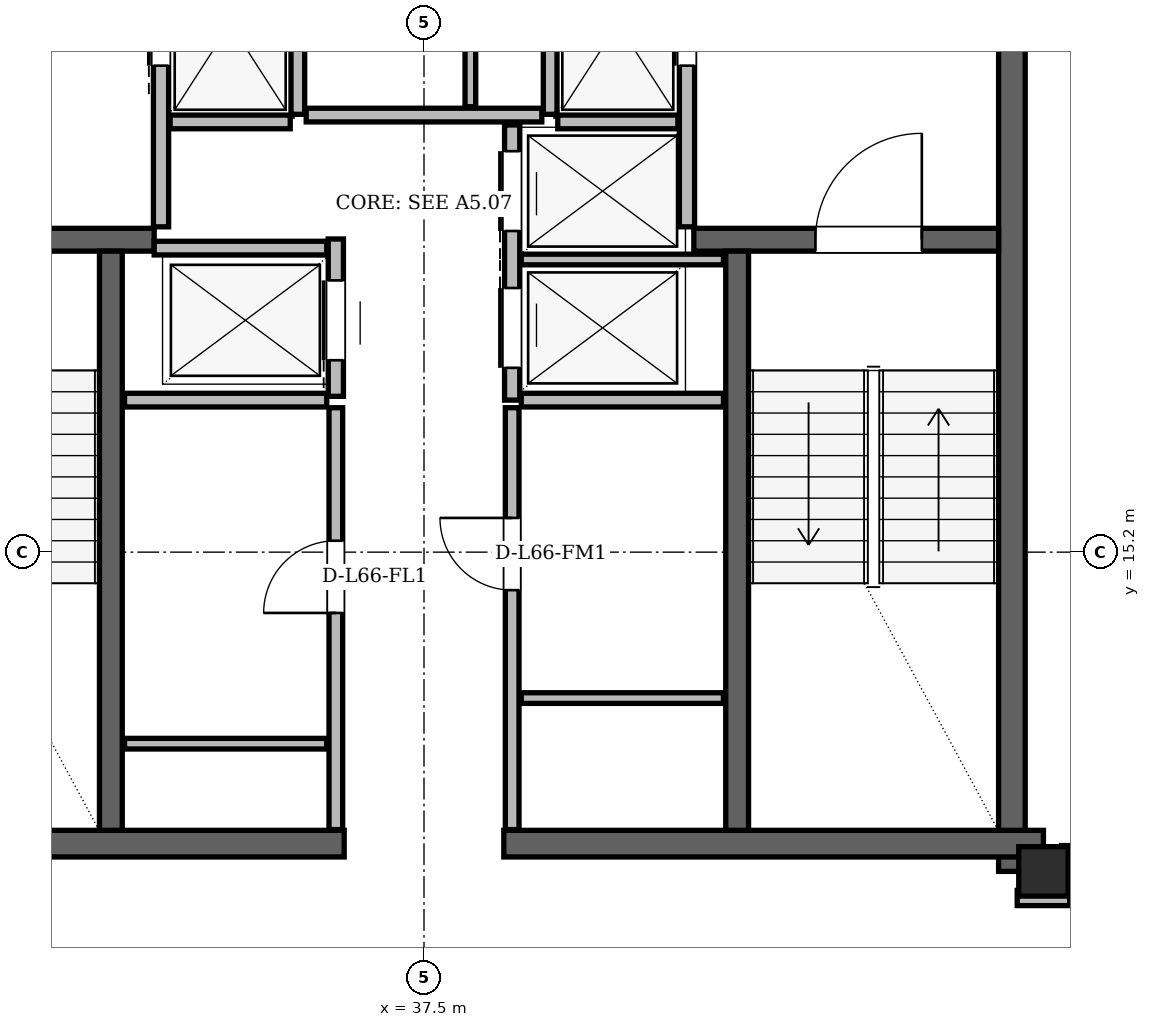
"""IFC4 building model, lengths in metres.
Left out: names, types, materials, properties, quantities, classifications, styles, units other than length and angle.
Written with IfcOpenShell. Run it as: python <this file> out.ifc"""

import sys

from ifc_helpers import new_model, si_unit, direction, frame, frame_2d, origin, origin_2d, place, context, subcontext, project, spatial, rectangle, hollow_rectangle, extrude, element, fill, save


model = new_model("IFC4")
c1 = context("Model", 3, precision=1e-05, world=origin(), true_north=direction((0.0, 1.0)))
c2 = subcontext(c1, "Body", "Model", "MODEL_VIEW")
j1 = project(units=[si_unit("LENGTHUNIT", "METRE"), si_unit("PLANEANGLEUNIT", "RADIAN")], contexts=[c1])
p1 = place(None, origin())
s1 = spatial("IfcSite", under=j1, at=p1, CompositionType="ELEMENT")
p2 = place(p1, origin())
s2 = spatial("IfcBuilding", under=s1, at=p2, CompositionType="ELEMENT")
p3 = place(p2, frame((0.0, 0.0, 249.9)))
s3 = spatial("IfcBuildingStorey", under=s2, at=p3, CompositionType="ELEMENT", Elevation=249.9)
p4 = place(p3, frame((45.65, 11.0, 0.0), z_axis=(0.0, 0.0, 1.0), x_axis=(1.0, 0.0, 0.0)))
e1 = element("IfcColumn", 1, at=p4, inside=s3, PredefinedType="COLUMN", context=c2, shape_type="SweptSolid", body=[
    extrude(hollow_rectangle(XDim=0.65, YDim=0.65, WallThickness=0.05, at=origin_2d()), origin(), (0.0, 0.0, 1.0), 3.9),
])
p5 = place(p3, frame((45.235, 11.0, 0.0), z_axis=(0.0, 0.0, 1.0), x_axis=(0.0, 1.0, 0.0)))
e2 = element("IfcWall", 2, at=p5, inside=s3, PredefinedType="SHEAR", context=c2, shape_type="SweptSolid", body=[
    extrude(rectangle(XDim=13.3, YDim=0.35, at=frame_2d((6.65, 0.0))), origin(), (0.0, 0.0, 1.0), 3.68),
])
for number, where, z_axis, x_axis in (
    (3, (29.35, 11.365, 0.0), (0.0, 0.0, 1.0), (1.0, 0.0, 0.0)),
    (4, (38.55, 11.365, 0.0), (0.0, 0.0, 1.0), (1.0, 0.0, 0.0)),
):
    element("IfcWall", number, at=place(p3, frame(where, z_axis=z_axis, x_axis=x_axis)), inside=s3, PredefinedType="SHEAR", context=c2, shape_type="SweptSolid", body=[
        extrude(rectangle(XDim=7.1, YDim=0.35, at=frame_2d((3.55, 0.0))), origin(), (0.0, 0.0, 1.0), 3.68),
    ])
p6 = place(p3, frame((29.94, 19.31, 0.0), z_axis=(0.0, 0.0, 1.0), x_axis=(1.0, 0.0, 0.0)))
e5 = element("IfcWall", 5, at=p6, inside=s3, PredefinedType="SHEAR", context=c2, shape_type="SweptSolid", body=[
    extrude(rectangle(XDim=4.01, YDim=0.3, at=frame_2d((2.005, 0.0))), origin(), (0.0, 0.0, 1.0), 3.68),
])
p7 = place(p6, frame((1.01, 0.0, 0.0)))
e6 = element("IfcOpeningElement", 6, at=p7, cuts=e5, PredefinedType="OPENING", context=c2, shape_type="SweptSolid", body=[
    extrude(rectangle(XDim=1.4, YDim=2.2, at=frame_2d((0.7, 1.1))), frame((0.0, 0.15, 0.0), z_axis=(0.0, -1.0, 0.0), x_axis=(1.0, 0.0, 0.0)), (0.0, 0.0, 1.0), 0.3),
])
p8 = place(p3, frame((41.05, 19.31, 0.0), z_axis=(0.0, 0.0, 1.0), x_axis=(1.0, 0.0, 0.0)))
e7 = element("IfcWall", 7, at=p8, inside=s3, PredefinedType="SHEAR", context=c2, shape_type="SweptSolid", body=[
    extrude(rectangle(XDim=4.01, YDim=0.3, at=frame_2d((2.005, 0.0))), origin(), (0.0, 0.0, 1.0), 3.68),
])
p9 = place(p8, frame((1.6, 0.0, 0.0)))
e8 = element("IfcOpeningElement", 8, at=p9, cuts=e7, PredefinedType="OPENING", context=c2, shape_type="SweptSolid", body=[
    extrude(rectangle(XDim=1.4, YDim=2.2, at=frame_2d((0.7, 1.1))), frame((0.0, 0.15, 0.0), z_axis=(0.0, -1.0, 0.0), x_axis=(1.0, 0.0, 0.0)), (0.0, 0.0, 1.0), 0.3),
])
for number, where, z_axis, x_axis in (
    (9, (33.38, 11.54, 0.0), (0.0, 0.0, 1.0), (0.0, 1.0, 0.0)),
    (10, (41.62, 11.54, 0.0), (0.0, 0.0, 1.0), (0.0, 1.0, 0.0)),
):
    element("IfcWall", number, at=place(p3, frame(where, z_axis=z_axis, x_axis=x_axis)), inside=s3, PredefinedType="SHEAR", context=c2, shape_type="SweptSolid", body=[
        extrude(rectangle(XDim=7.62, YDim=0.3, at=frame_2d((3.81, 0.0))), origin(), (0.0, 0.0, 1.0), 3.68),
    ])
p10 = place(p3, frame((58.774, 10.99, 0.0), z_axis=(0.0, 0.0, 1.0), x_axis=(-0.499994896969, 0.866028350001, 0.0)))
e11 = element("IfcWall", 11, at=p10, inside=s3, PredefinedType="SOLIDWALL", context=c2, shape_type="SweptSolid", body=[
    extrude(rectangle(XDim=37.053, YDim=0.29, at=frame_2d((18.526, 0.0))), origin(), (0.0, 0.0, 1.0), 3.058),
])
p11 = place(p10, frame((6.789, 0.0, 0.0)))
e12 = element("IfcOpeningElement", 12, at=p11, cuts=e11, PredefinedType="OPENING", context=c2, shape_type="SweptSolid", body=[
    extrude(rectangle(XDim=1.5, YDim=2.2, at=frame_2d((0.75, 1.1))), frame((0.0, 0.145, 0.0), z_axis=(0.0, -1.0, 0.0), x_axis=(1.0, 0.0, 0.0)), (0.0, 0.0, 1.0), 0.29),
])
p12 = place(p10, frame((28.148, 0.0, 0.0)))
e13 = element("IfcOpeningElement", 13, at=p12, cuts=e11, PredefinedType="OPENING", context=c2, shape_type="SweptSolid", body=[
    extrude(rectangle(XDim=1.5, YDim=2.2, at=frame_2d((0.75, 1.1))), frame((0.0, 0.145, 0.0), z_axis=(0.0, -1.0, 0.0), x_axis=(1.0, 0.0, 0.0)), (0.0, 0.0, 1.0), 0.29),
])
p13 = place(p10, frame((12.184, 0.0, 0.85)))
e14 = element("IfcOpeningElement", 14, at=p13, cuts=e11, PredefinedType="OPENING", context=c2, shape_type="SweptSolid", body=[
    extrude(rectangle(XDim=2.6, YDim=1.95, at=frame_2d((1.3, 0.975))), frame((0.0, 0.145, 0.0), z_axis=(0.0, -1.0, 0.0), x_axis=(1.0, 0.0, 0.0)), (0.0, 0.0, 1.0), 0.29),
])
p14 = place(p10, frame((1.066, 0.0, 0.85)))
e15 = element("IfcOpeningElement", 15, at=p14, cuts=e11, PredefinedType="OPENING", context=c2, shape_type="SweptSolid", body=[
    extrude(rectangle(XDim=2.4, YDim=1.9, at=frame_2d((1.2, 0.95))), frame((0.0, 0.145, 0.0), z_axis=(0.0, -1.0, 0.0), x_axis=(1.0, 0.0, 0.0)), (0.0, 0.0, 1.0), 0.29),
])
p15 = place(p10, frame((33.328, 0.0, 0.85)))
e16 = element("IfcOpeningElement", 16, at=p15, cuts=e11, PredefinedType="OPENING", context=c2, shape_type="SweptSolid", body=[
    extrude(rectangle(XDim=1.2, YDim=1.48, at=frame_2d((0.6, 0.74))), frame((0.0, 0.145, 0.0), z_axis=(0.0, -1.0, 0.0), x_axis=(1.0, 0.0, 0.0)), (0.0, 0.0, 1.0), 0.29),
])
p16 = place(p10, frame((15.822, 0.0, 0.85)))
e17 = element("IfcOpeningElement", 17, at=p16, cuts=e11, PredefinedType="OPENING", context=c2, shape_type="SweptSolid", body=[
    extrude(rectangle(XDim=1.2, YDim=1.48, at=frame_2d((0.6, 0.74))), frame((0.0, 0.145, 0.0), z_axis=(0.0, -1.0, 0.0), x_axis=(1.0, 0.0, 0.0)), (0.0, 0.0, 1.0), 0.29),
])
p17 = place(p10, frame((23.327, 0.0, 0.85)))
e18 = element("IfcOpeningElement", 18, at=p17, cuts=e11, PredefinedType="OPENING", context=c2, shape_type="SweptSolid", body=[
    extrude(rectangle(XDim=1.2, YDim=1.48, at=frame_2d((0.6, 0.74))), frame((0.0, 0.145, 0.0), z_axis=(0.0, -1.0, 0.0), x_axis=(1.0, 0.0, 0.0)), (0.0, 0.0, 1.0), 0.29),
])
p18 = place(p3, frame((34.752, 43.079, 0.0), z_axis=(0.0, 0.0, 1.0), x_axis=(-0.499994896969, -0.866028350001, 0.0)))
e19 = element("IfcWall", 19, at=p18, inside=s3, PredefinedType="SOLIDWALL", context=c2, shape_type="SweptSolid", body=[
    extrude(rectangle(XDim=37.053, YDim=0.29, at=frame_2d((18.526, 0.0))), origin(), (0.0, 0.0, 1.0), 3.058),
])
p19 = place(p18, frame((3.639, 0.0, 0.0)))
e20 = element("IfcOpeningElement", 20, at=p19, cuts=e19, PredefinedType="OPENING", context=c2, shape_type="SweptSolid", body=[
    extrude(rectangle(XDim=1.5, YDim=2.2, at=frame_2d((0.75, 1.1))), frame((0.0, 0.145, 0.0), z_axis=(0.0, -1.0, 0.0), x_axis=(1.0, 0.0, 0.0)), (0.0, 0.0, 1.0), 0.29),
])
p20 = place(p18, frame((27.518, 0.0, 0.0)))
e21 = element("IfcOpeningElement", 21, at=p20, cuts=e19, PredefinedType="OPENING", context=c2, shape_type="SweptSolid", body=[
    extrude(rectangle(XDim=1.5, YDim=2.2, at=frame_2d((0.75, 1.1))), frame((0.0, 0.145, 0.0), z_axis=(0.0, -1.0, 0.0), x_axis=(1.0, 0.0, 0.0)), (0.0, 0.0, 1.0), 0.29),
])
p21 = place(p18, frame((22.803, 0.0, 0.85)))
e22 = element("IfcOpeningElement", 22, at=p21, cuts=e19, PredefinedType="OPENING", context=c2, shape_type="SweptSolid", body=[
    extrude(rectangle(XDim=1.6, YDim=1.7, at=frame_2d((0.8, 0.85))), frame((0.0, 0.145, 0.0), z_axis=(0.0, -1.0, 0.0), x_axis=(1.0, 0.0, 0.0)), (0.0, 0.0, 1.0), 0.29),
])
p22 = place(p18, frame((34.371, 0.0, 0.85)))
e23 = element("IfcOpeningElement", 23, at=p22, cuts=e19, PredefinedType="OPENING", context=c2, shape_type="SweptSolid", body=[
    extrude(rectangle(XDim=1.4, YDim=1.6, at=frame_2d((0.7, 0.8))), frame((0.0, 0.145, 0.0), z_axis=(0.0, -1.0, 0.0), x_axis=(1.0, 0.0, 0.0)), (0.0, 0.0, 1.0), 0.29),
])
p23 = place(p18, frame((8.135, 0.0, 0.85)))
e24 = element("IfcOpeningElement", 24, at=p23, cuts=e19, PredefinedType="OPENING", context=c2, shape_type="SweptSolid", body=[
    extrude(rectangle(XDim=1.8, YDim=1.75, at=frame_2d((0.9, 0.875))), frame((0.0, 0.145, 0.0), z_axis=(0.0, -1.0, 0.0), x_axis=(1.0, 0.0, 0.0)), (0.0, 0.0, 1.0), 0.29),
])
p24 = place(p18, frame((17.81, 0.0, 0.85)))
e25 = element("IfcOpeningElement", 25, at=p24, cuts=e19, PredefinedType="OPENING", context=c2, shape_type="SweptSolid", body=[
    extrude(rectangle(XDim=1.2, YDim=1.48, at=frame_2d((0.6, 0.74))), frame((0.0, 0.145, 0.0), z_axis=(0.0, -1.0, 0.0), x_axis=(1.0, 0.0, 0.0)), (0.0, 0.0, 1.0), 0.29),
])
p25 = place(p18, frame((1.294, 0.0, 0.85)))
e26 = element("IfcOpeningElement", 26, at=p25, cuts=e19, PredefinedType="OPENING", context=c2, shape_type="SweptSolid", body=[
    extrude(rectangle(XDim=1.6, YDim=1.7, at=frame_2d((0.8, 0.85))), frame((0.0, 0.145, 0.0), z_axis=(0.0, -1.0, 0.0), x_axis=(1.0, 0.0, 0.0)), (0.0, 0.0, 1.0), 0.29),
])
p26 = place(p3, frame((34.04, 19.48, 0.0), z_axis=(0.0, 0.0, 1.0), x_axis=(0.0, 1.0, 0.0)))
e27 = element("IfcWall", 27, at=p26, inside=s3, PredefinedType="PARTITIONING", context=c2, shape_type="SweptSolid", body=[
    extrude(rectangle(XDim=4.5, YDim=0.2, at=frame_2d((2.25, 0.0))), origin(), (0.0, 0.0, 1.0), 3.68),
])
p27 = place(p26, frame((2.12, 0.0, 0.0)))
e28 = element("IfcOpeningElement", 28, at=p27, cuts=e27, PredefinedType="OPENING", context=c2, shape_type="SweptSolid", body=[
    extrude(rectangle(XDim=1.1, YDim=2.2, at=frame_2d((0.55, 1.1))), frame((0.0, 0.1, 0.0), z_axis=(0.0, -1.0, 0.0), x_axis=(1.0, 0.0, 0.0)), (0.0, 0.0, 1.0), 0.2),
])
p28 = place(p3, frame((35.84, 20.96, 0.0), z_axis=(0.0, 0.0, 1.0), x_axis=(0.0, 1.0, 0.0)))
e29 = element("IfcWall", 29, at=p28, inside=s3, PredefinedType="PARTITIONING", context=c2, shape_type="SweptSolid", body=[
    extrude(rectangle(XDim=3.02, YDim=0.18, at=frame_2d((1.51, 0.0))), origin(), (0.0, 0.0, 1.0), 3.68),
])
p29 = place(p3, frame((34.16, 20.86, 0.0), z_axis=(0.0, 0.0, 1.0), x_axis=(1.0, 0.0, 0.0)))
e30 = element("IfcWall", 30, at=p29, inside=s3, PredefinedType="PARTITIONING", context=c2, shape_type="SweptSolid", body=[
    extrude(rectangle(XDim=1.58, YDim=0.18, at=frame_2d((0.79, 0.0))), origin(), (0.0, 0.0, 1.0), 3.68),
])
p30 = place(p3, frame((40.96, 19.48, 0.0), z_axis=(0.0, 0.0, 1.0), x_axis=(0.0, 1.0, 0.0)))
e31 = element("IfcWall", 31, at=p30, inside=s3, PredefinedType="PARTITIONING", context=c2, shape_type="SweptSolid", body=[
    extrude(rectangle(XDim=4.5, YDim=0.2, at=frame_2d((2.25, 0.0))), origin(), (0.0, 0.0, 1.0), 3.68),
])
p31 = place(p30, frame((2.12, 0.0, 0.0)))
e32 = element("IfcOpeningElement", 32, at=p31, cuts=e31, PredefinedType="OPENING", context=c2, shape_type="SweptSolid", body=[
    extrude(rectangle(XDim=1.1, YDim=2.2, at=frame_2d((0.55, 1.1))), frame((0.0, 0.1, 0.0), z_axis=(0.0, -1.0, 0.0), x_axis=(1.0, 0.0, 0.0)), (0.0, 0.0, 1.0), 0.2),
])
p32 = place(p3, frame((39.16, 20.96, 0.0), z_axis=(0.0, 0.0, 1.0), x_axis=(0.0, 1.0, 0.0)))
e33 = element("IfcWall", 33, at=p32, inside=s3, PredefinedType="PARTITIONING", context=c2, shape_type="SweptSolid", body=[
    extrude(rectangle(XDim=3.02, YDim=0.18, at=frame_2d((1.51, 0.0))), origin(), (0.0, 0.0, 1.0), 3.68),
])
p33 = place(p3, frame((39.26, 20.86, 0.0), z_axis=(0.0, 0.0, 1.0), x_axis=(1.0, 0.0, 0.0)))
e34 = element("IfcWall", 34, at=p33, inside=s3, PredefinedType="PARTITIONING", context=c2, shape_type="SweptSolid", body=[
    extrude(rectangle(XDim=1.58, YDim=0.18, at=frame_2d((0.79, 0.0))), origin(), (0.0, 0.0, 1.0), 3.68),
])
p34 = place(p3, frame((36.34, 17.25, 0.0), z_axis=(0.0, 0.0, 1.0), x_axis=(0.0, 1.0, 0.0)))
e35 = element("IfcWall", 35, at=p34, inside=s3, PredefinedType="PARTITIONING", context=c2, shape_type="SweptSolid", body=[
    extrude(rectangle(XDim=2.07, YDim=0.2, at=frame_2d((1.035, 0.0))), origin(), (0.0, 0.0, 1.0), 3.68),
])
p35 = place(p34, frame((0.475, 0.0, 0.0)))
e36 = element("IfcOpeningElement", 36, at=p35, cuts=e35, PredefinedType="OPENING", context=c2, shape_type="SweptSolid", body=[
    extrude(rectangle(XDim=1.05, YDim=2.15, at=frame_2d((0.525, 1.075))), frame((0.0, 0.1, 0.0), z_axis=(0.0, -1.0, 0.0), x_axis=(1.0, 0.0, 0.0)), (0.0, 0.0, 1.0), 0.2),
])
p36 = place(p3, frame((33.95, 19.2, 0.0), z_axis=(0.0, 0.0, 1.0), x_axis=(1.0, 0.0, 0.0)))
e37 = element("IfcWall", 37, at=p36, inside=s3, PredefinedType="PARTITIONING", context=c2, shape_type="SweptSolid", body=[
    extrude(rectangle(XDim=2.27, YDim=0.18, at=frame_2d((1.135, 0.0))), origin(), (0.0, 0.0, 1.0), 3.68),
])
p37 = place(p3, frame((33.56, 17.2, 0.0), z_axis=(0.0, 0.0, 1.0), x_axis=(1.0, 0.0, 0.0)))
e38 = element("IfcWall", 38, at=p37, inside=s3, PredefinedType="PARTITIONING", context=c2, shape_type="SweptSolid", body=[
    extrude(rectangle(XDim=2.66, YDim=0.18, at=frame_2d((1.33, 0.0))), origin(), (0.0, 0.0, 1.0), 3.68),
])
p38 = place(p3, frame((36.34, 11.55, 0.0), z_axis=(0.0, 0.0, 1.0), x_axis=(0.0, 1.0, 0.0)))
e39 = element("IfcWall", 39, at=p38, inside=s3, PredefinedType="PARTITIONING", context=c2, shape_type="SweptSolid", body=[
    extrude(rectangle(XDim=5.55, YDim=0.18, at=frame_2d((2.775, 0.0))), origin(), (0.0, 0.0, 1.0), 3.68),
])
p39 = place(p38, frame((2.85, 0.0, 0.0)))
e40 = element("IfcOpeningElement", 40, at=p39, cuts=e39, PredefinedType="OPENING", context=c2, shape_type="SweptSolid", body=[
    extrude(rectangle(XDim=0.95, YDim=2.1, at=frame_2d((0.475, 1.05))), frame((0.0, 0.09, 0.0), z_axis=(0.0, -1.0, 0.0), x_axis=(1.0, 0.0, 0.0)), (0.0, 0.0, 1.0), 0.18),
])
p40 = place(p3, frame((33.56, 12.68, 0.0), z_axis=(0.0, 0.0, 1.0), x_axis=(1.0, 0.0, 0.0)))
e41 = element("IfcWall", 41, at=p40, inside=s3, PredefinedType="PARTITIONING", context=c2, shape_type="SweptSolid", body=[
    extrude(rectangle(XDim=2.66, YDim=0.14, at=frame_2d((1.33, 0.0))), origin(), (0.0, 0.0, 1.0), 3.68),
])
p41 = place(p3, frame((38.66, 17.2, 0.0), z_axis=(0.0, 0.0, 1.0), x_axis=(0.0, 1.0, 0.0)))
e42 = element("IfcWall", 42, at=p41, inside=s3, PredefinedType="PARTITIONING", context=c2, shape_type="SweptSolid", body=[
    extrude(rectangle(XDim=3.62, YDim=0.2, at=frame_2d((1.81, 0.0))), origin(), (0.0, 0.0, 1.0), 3.68),
])
p42 = place(p41, frame((0.425, 0.0, 0.0)))
e43 = element("IfcOpeningElement", 43, at=p42, cuts=e42, PredefinedType="OPENING", context=c2, shape_type="SweptSolid", body=[
    extrude(rectangle(XDim=1.05, YDim=2.15, at=frame_2d((0.525, 1.075))), frame((0.0, 0.1, 0.0), z_axis=(0.0, -1.0, 0.0), x_axis=(1.0, 0.0, 0.0)), (0.0, 0.0, 1.0), 0.2),
])
p43 = place(p41, frame((2.225, 0.0, 0.0)))
e44 = element("IfcOpeningElement", 44, at=p43, cuts=e42, PredefinedType="OPENING", context=c2, shape_type="SweptSolid", body=[
    extrude(rectangle(XDim=1.05, YDim=2.15, at=frame_2d((0.525, 1.075))), frame((0.0, 0.1, 0.0), z_axis=(0.0, -1.0, 0.0), x_axis=(1.0, 0.0, 0.0)), (0.0, 0.0, 1.0), 0.2),
])
p44 = place(p3, frame((38.78, 17.2, 0.0), z_axis=(0.0, 0.0, 1.0), x_axis=(1.0, 0.0, 0.0)))
e45 = element("IfcWall", 45, at=p44, inside=s3, PredefinedType="PARTITIONING", context=c2, shape_type="SweptSolid", body=[
    extrude(rectangle(XDim=2.66, YDim=0.18, at=frame_2d((1.33, 0.0))), origin(), (0.0, 0.0, 1.0), 3.68),
])
p45 = place(p3, frame((38.78, 19.05, 0.0), z_axis=(0.0, 0.0, 1.0), x_axis=(1.0, 0.0, 0.0)))
e46 = element("IfcWall", 46, at=p45, inside=s3, PredefinedType="PARTITIONING", context=c2, shape_type="SweptSolid", body=[
    extrude(rectangle(XDim=2.66, YDim=0.14, at=frame_2d((1.33, 0.0))), origin(), (0.0, 0.0, 1.0), 3.68),
])
p46 = place(p3, frame((38.66, 11.55, 0.0), z_axis=(0.0, 0.0, 1.0), x_axis=(0.0, 1.0, 0.0)))
e47 = element("IfcWall", 47, at=p46, inside=s3, PredefinedType="PARTITIONING", context=c2, shape_type="SweptSolid", body=[
    extrude(rectangle(XDim=5.55, YDim=0.18, at=frame_2d((2.775, 0.0))), origin(), (0.0, 0.0, 1.0), 3.68),
])
p47 = place(p46, frame((3.15, 0.0, 0.0)))
e48 = element("IfcOpeningElement", 48, at=p47, cuts=e47, PredefinedType="OPENING", context=c2, shape_type="SweptSolid", body=[
    extrude(rectangle(XDim=0.95, YDim=2.1, at=frame_2d((0.475, 1.05))), frame((0.0, 0.09, 0.0), z_axis=(0.0, -1.0, 0.0), x_axis=(1.0, 0.0, 0.0)), (0.0, 0.0, 1.0), 0.18),
])
p48 = place(p3, frame((38.78, 13.28, 0.0), z_axis=(0.0, 0.0, 1.0), x_axis=(1.0, 0.0, 0.0)))
e49 = element("IfcWall", 49, at=p48, inside=s3, PredefinedType="PARTITIONING", context=c2, shape_type="SweptSolid", body=[
    extrude(rectangle(XDim=2.66, YDim=0.14, at=frame_2d((1.33, 0.0))), origin(), (0.0, 0.0, 1.0), 3.68),
])
p49 = place(p3, frame((35.95, 20.95, 0.0), z_axis=(0.0, 0.0, 1.0), x_axis=(1.0, 0.0, 0.0)))
e50 = element("IfcWall", 50, at=p49, inside=s3, PredefinedType="PARTITIONING", context=c2, shape_type="SweptSolid", body=[
    extrude(rectangle(XDim=3.1, YDim=0.18, at=frame_2d((1.55, 0.0))), origin(), (0.0, 0.0, 1.0), 3.68),
])
p50 = place(p3, frame((38.11, 21.06, 0.0), z_axis=(0.0, 0.0, 1.0), x_axis=(0.0, 1.0, 0.0)))
e51 = element("IfcWall", 51, at=p50, inside=s3, PredefinedType="PARTITIONING", context=c2, shape_type="SweptSolid", body=[
    extrude(rectangle(XDim=2.92, YDim=0.14, at=frame_2d((1.46, 0.0))), origin(), (0.0, 0.0, 1.0), 3.68),
])
p51 = place(p3, frame((45.305, 10.65, 0.0), z_axis=(0.0, 0.0, 1.0), x_axis=(1.0, 0.0, 0.0)))
e52 = element("IfcWall", 52, at=p51, inside=s3, PredefinedType="PARTITIONING", context=c2, shape_type="SweptSolid", body=[
    extrude(rectangle(XDim=0.69, YDim=0.2, at=frame_2d((0.345, 0.0))), origin(), (0.0, 0.0, 1.0), 3.68),
])
p52 = place(p3, frame((45.99, 10.95, 0.0), z_axis=(0.0, 0.0, 1.0), x_axis=(0.0, 1.0, 0.0)))
e53 = element("IfcWall", 53, at=p52, inside=s3, PredefinedType="PARTITIONING", context=c2, shape_type="SweptSolid", body=[
    extrude(rectangle(XDim=0.39, YDim=0.2, at=frame_2d((0.195, 0.0))), origin(), (0.0, 0.0, 1.0), 3.266),
])
p53 = place(p39, origin())
e54 = element("IfcDoor", 54, at=p53, inside=s3, OperationType="SINGLE_SWING_LEFT", PredefinedType="DOOR", context=c2, shape_type="SweptSolid", body=[
    extrude(rectangle(XDim=0.95, YDim=2.1, at=frame_2d((0.475, 1.05))), frame((0.0, 0.025, 0.0), z_axis=(0.0, -1.0, 0.0), x_axis=(1.0, 0.0, 0.0)), (0.0, 0.0, 1.0), 0.05),
])
fill(e40, e54)
p54 = place(p47, origin())
e55 = element("IfcDoor", 55, at=p54, inside=s3, OperationType="SINGLE_SWING_RIGHT", PredefinedType="DOOR", context=c2, shape_type="SweptSolid", body=[
    extrude(rectangle(XDim=0.95, YDim=2.1, at=frame_2d((0.475, 1.05))), frame((0.0, 0.025, 0.0), z_axis=(0.0, -1.0, 0.0), x_axis=(1.0, 0.0, 0.0)), (0.0, 0.0, 1.0), 0.05),
])
fill(e48, e55)
p55 = place(p27, origin())
e56 = element("IfcDoor", 56, at=p55, inside=s3, OperationType="SLIDING_TO_LEFT", PredefinedType="DOOR", context=c2, shape_type="SweptSolid", body=[
    extrude(rectangle(XDim=1.1, YDim=2.2, at=frame_2d((0.55, 1.1))), frame((0.0, 0.025, 0.0), z_axis=(0.0, -1.0, 0.0), x_axis=(1.0, 0.0, 0.0)), (0.0, 0.0, 1.0), 0.05),
])
fill(e28, e56)
p56 = place(p31, origin())
e57 = element("IfcDoor", 57, at=p56, inside=s3, OperationType="SLIDING_TO_RIGHT", PredefinedType="DOOR", context=c2, shape_type="SweptSolid", body=[
    extrude(rectangle(XDim=1.1, YDim=2.2, at=frame_2d((0.55, 1.1))), frame((0.0, 0.025, 0.0), z_axis=(0.0, -1.0, 0.0), x_axis=(1.0, 0.0, 0.0)), (0.0, 0.0, 1.0), 0.05),
])
fill(e32, e57)
p57 = place(p35, origin())
e58 = element("IfcDoor", 58, at=p57, inside=s3, OperationType="SLIDING_TO_LEFT", PredefinedType="DOOR", context=c2, shape_type="SweptSolid", body=[
    extrude(rectangle(XDim=1.05, YDim=2.15, at=frame_2d((0.525, 1.075))), frame((0.0, 0.025, 0.0), z_axis=(0.0, -1.0, 0.0), x_axis=(1.0, 0.0, 0.0)), (0.0, 0.0, 1.0), 0.05),
])
fill(e36, e58)
p58 = place(p42, origin())
e59 = element("IfcDoor", 59, at=p58, inside=s3, OperationType="SLIDING_TO_RIGHT", PredefinedType="DOOR", context=c2, shape_type="SweptSolid", body=[
    extrude(rectangle(XDim=1.05, YDim=2.15, at=frame_2d((0.525, 1.075))), frame((0.0, 0.025, 0.0), z_axis=(0.0, -1.0, 0.0), x_axis=(1.0, 0.0, 0.0)), (0.0, 0.0, 1.0), 0.05),
])
fill(e43, e59)
p59 = place(p43, origin())
e60 = element("IfcDoor", 60, at=p59, inside=s3, OperationType="SLIDING_TO_LEFT", PredefinedType="DOOR", context=c2, shape_type="SweptSolid", body=[
    extrude(rectangle(XDim=1.05, YDim=2.15, at=frame_2d((0.525, 1.075))), frame((0.0, 0.025, 0.0), z_axis=(0.0, -1.0, 0.0), x_axis=(1.0, 0.0, 0.0)), (0.0, 0.0, 1.0), 0.05),
])
fill(e44, e60)
p60 = place(p9, origin())
e61 = element("IfcDoor", 61, at=p60, inside=s3, OperationType="SINGLE_SWING_RIGHT", PredefinedType="DOOR", context=c2, shape_type="SweptSolid", body=[
    extrude(rectangle(XDim=1.4, YDim=2.2, at=frame_2d((0.7, 1.1))), frame((0.0, 0.025, 0.0), z_axis=(0.0, -1.0, 0.0), x_axis=(1.0, 0.0, 0.0)), (0.0, 0.0, 1.0), 0.05),
])
fill(e8, e61)
save(model, sys.argv[1])
